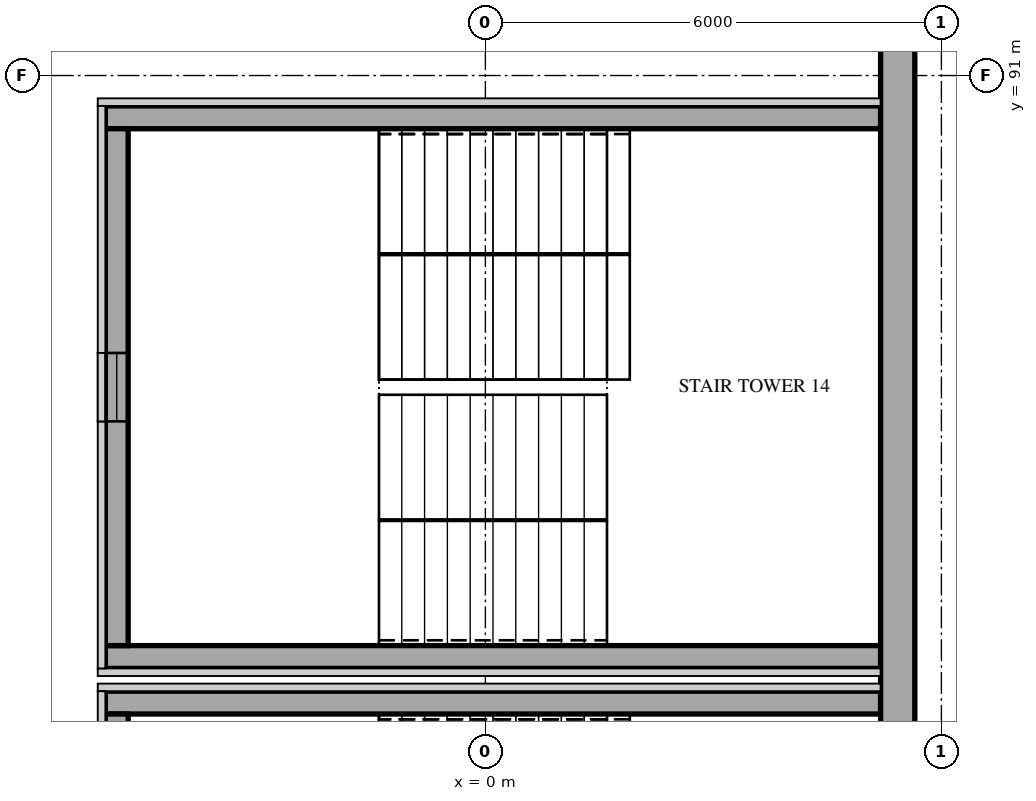
"""IFC4 building model, lengths in metres.
Left out: names, types, materials, properties, quantities, classifications, styles, units other than length and angle.
Written with IfcOpenShell. Run it as: python <this file> out.ifc"""

import sys

from ifc_helpers import new_model, si_unit, direction, frame, frame_2d, origin, place, context, subcontext, project, spatial, rectangle, extrude, element, fill, save


model = new_model("IFC4")
c1 = context("Model", 3, precision=1e-05, world=origin(), true_north=direction((0.0, 1.0)))
c2 = subcontext(c1, "Body", "Model", "MODEL_VIEW")
j1 = project(units=[si_unit("LENGTHUNIT", "METRE"), si_unit("PLANEANGLEUNIT", "RADIAN")], contexts=[c1])
p1 = place(None, origin())
s1 = spatial("IfcSite", under=j1, at=p1, CompositionType="ELEMENT")
p2 = place(p1, origin())
s2 = spatial("IfcBuilding", under=s1, at=p2, CompositionType="ELEMENT")
p3 = place(p2, frame((0.0, 0.0, 5.0)))
s3 = spatial("IfcBuildingStorey", under=s2, at=p3, CompositionType="ELEMENT", Elevation=5.0)
p4 = place(p3, frame((5.2, 82.75, 0.0), z_axis=(0.0, 0.0, 1.0), x_axis=(-1.0, 0.0, 0.0)))
e1 = element("IfcWall", 1, at=p4, inside=s3, PredefinedType="SHEAR", context=c2, shape_type="SweptSolid", body=[
    extrude(rectangle(XDim=10.2, YDim=0.3, at=frame_2d((5.1, 0.0))), origin(), (0.0, 0.0, 1.0), 5.0),
])
p5 = place(p3, frame((-4.85, 75.8, 0.0), z_axis=(0.0, 0.0, 1.0), x_axis=(0.0, 1.0, 0.0)))
e2 = element("IfcWall", 2, at=p5, inside=s3, PredefinedType="SHEAR", context=c2, shape_type="SweptSolid", body=[
    extrude(rectangle(XDim=6.8, YDim=0.3, at=frame_2d((3.4, 0.0))), origin(), (0.0, 0.0, 1.0), 5.0),
])
p6 = place(p5, frame((2.95, 0.0, 2.67)))
e3 = element("IfcOpeningElement", 3, at=p6, cuts=e2, PredefinedType="OPENING", context=c2, shape_type="SweptSolid", body=[
    extrude(rectangle(XDim=0.9, YDim=1.5, at=frame_2d((0.45, 0.75))), frame((0.0, 0.16, 0.0), z_axis=(0.0, -1.0, 0.0), x_axis=(1.0, 0.0, 0.0)), (0.0, 0.0, 1.0), 0.32),
])
for number, where, z_axis, x_axis in (
    (4, (5.2, 83.35, 0.0), (0.0, 0.0, 1.0), (-1.0, 0.0, 0.0)),
    (5, (5.2, 90.45, 0.0), (0.0, 0.0, 1.0), (-1.0, 0.0, 0.0)),
):
    element("IfcWall", number, at=place(p3, frame(where, z_axis=z_axis, x_axis=x_axis)), inside=s3, PredefinedType="SHEAR", context=c2, shape_type="SweptSolid", body=[
        extrude(rectangle(XDim=10.2, YDim=0.3, at=frame_2d((5.1, 0.0))), origin(), (0.0, 0.0, 1.0), 5.0),
    ])
p7 = place(p3, frame((-4.85, 83.5, 0.0), z_axis=(0.0, 0.0, 1.0), x_axis=(0.0, 1.0, 0.0)))
e6 = element("IfcWall", 6, at=p7, inside=s3, PredefinedType="SHEAR", context=c2, shape_type="SweptSolid", body=[
    extrude(rectangle(XDim=6.8, YDim=0.3, at=frame_2d((3.4, 0.0))), origin(), (0.0, 0.0, 1.0), 5.0),
])
p8 = place(p7, frame((2.95, 0.0, 2.67)))
e7 = element("IfcOpeningElement", 7, at=p8, cuts=e6, PredefinedType="OPENING", context=c2, shape_type="SweptSolid", body=[
    extrude(rectangle(XDim=0.9, YDim=1.5, at=frame_2d((0.45, 0.75))), frame((0.0, 0.16, 0.0), z_axis=(0.0, -1.0, 0.0), x_axis=(1.0, 0.0, 0.0)), (0.0, 0.0, 1.0), 0.32),
])
p9 = place(p3, frame((5.425, 46.75, 0.0), z_axis=(0.0, 0.0, 1.0), x_axis=(0.0, 1.0, 0.0)))
e8 = element("IfcWall", 8, at=p9, inside=s3, PredefinedType="SOLIDWALL", context=c2, shape_type="SweptSolid", body=[
    extrude(rectangle(XDim=61.65, YDim=0.45, at=frame_2d((30.825, 0.0))), origin(), (0.0, 0.0, 1.0), 5.0),
])
p10 = place(p8, origin())
e9 = element("IfcWindow", 9, at=p10, inside=s3, PartitioningType="SINGLE_PANEL", PredefinedType="WINDOW", context=c2, shape_type="SweptSolid", body=[
    extrude(rectangle(XDim=0.9, YDim=1.5, at=frame_2d((0.45, 0.75))), frame((0.0, 0.03, 0.0), z_axis=(0.0, -1.0, 0.0), x_axis=(1.0, 0.0, 0.0)), (0.0, 0.0, 1.0), 0.06),
])
fill(e7, e9)
save(model, sys.argv[1])
